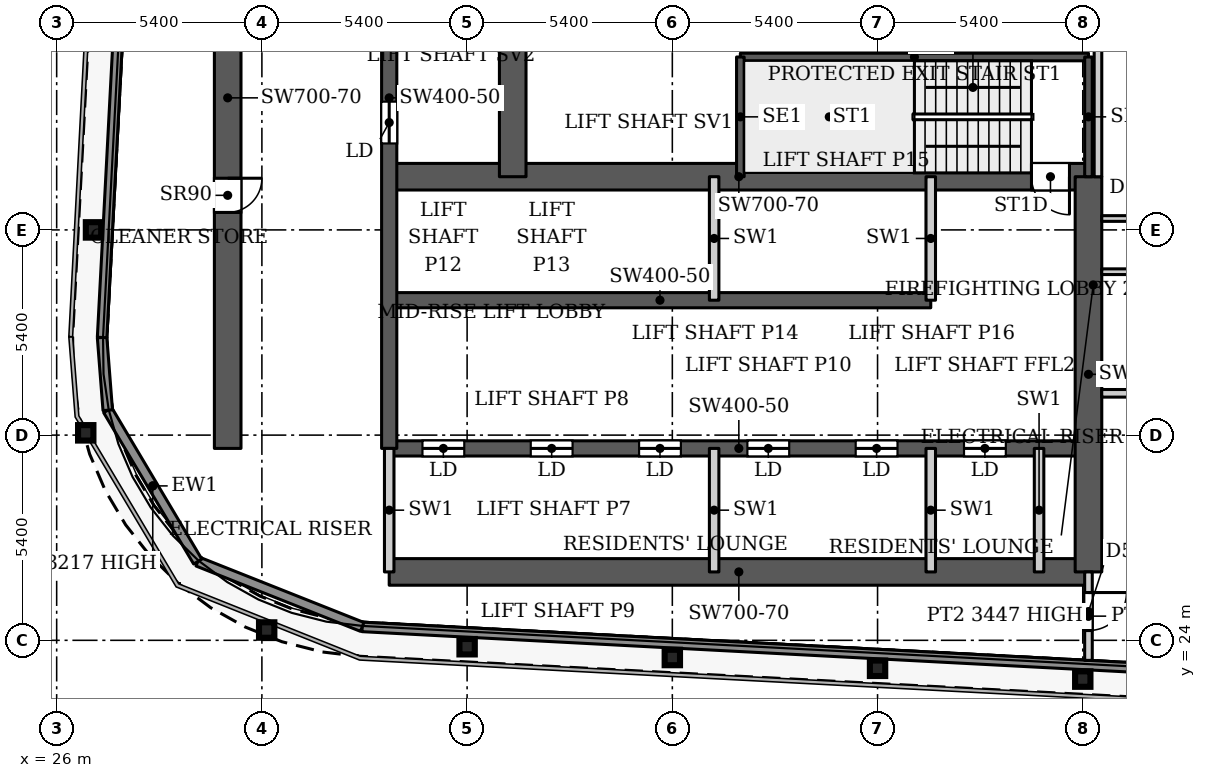
"""IFC4 building model, lengths in metres.
Left out: names, types, materials, properties, quantities, classifications, styles, units other than length and angle.
Written with IfcOpenShell. Run it as: python <this file> out.ifc"""

import sys

from ifc_helpers import new_model, si_unit, direction, frame, frame_2d, origin, origin_2d, place, context, subcontext, project, spatial, rectangle, i_section, extrude, source, transform, mapped, element, fill, save


model = new_model("IFC4")
c1 = context("Model", 3, precision=1e-05, world=origin(), true_north=direction((0.0, 1.0)))
c2 = subcontext(c1, "Body", "Model", "MODEL_VIEW")
j1 = project(units=[si_unit("LENGTHUNIT", "METRE"), si_unit("PLANEANGLEUNIT", "RADIAN")], contexts=[c1])
p1 = place(None, origin())
s1 = spatial("IfcSite", under=j1, at=p1, CompositionType="ELEMENT")
p2 = place(p1, origin())
s2 = spatial("IfcBuilding", under=s1, at=p2, CompositionType="ELEMENT")
p3 = place(p2, frame((0.0, 0.0, 216.2)))
s3 = spatial("IfcBuildingStorey", under=s2, at=p3, CompositionType="ELEMENT", Elevation=216.2)
for number, where, z_axis, x_axis in (
    (1, (53.0, 22.98, 0.0), (0.0, 0.0, 1.0), (1.0, 0.0, 0.0)),
    (2, (47.6, 23.264, 0.0), (0.0, 0.0, 1.0), (1.0, 0.0, 0.0)),
    (3, (42.2, 23.548, 0.0), (0.0, 0.0, 1.0), (1.0, 0.0, 0.0)),
    (4, (36.8, 23.832, 0.0), (0.0, 0.0, 1.0), (1.0, 0.0, 0.0)),
    (5, (31.526, 24.271, 0.0), (0.0, 0.0, 1.0), (1.0, 0.0, 0.0)),
    (6, (26.765, 29.46, 0.0), (0.0, 0.0, 1.0), (1.0, 0.0, 0.0)),
    (7, (26.969, 34.8, 0.0), (0.0, 0.0, 1.0), (1.0, 0.0, 0.0)),
):
    element("IfcColumn", number, at=place(p3, frame(where, z_axis=z_axis, x_axis=x_axis)), inside=s3, PredefinedType="COLUMN", context=c2, shape_type="SweptSolid", body=[
        extrude(i_section(OverallWidth=0.404, OverallDepth=0.407, WebThickness=0.027, FlangeThickness=0.044, FilletRadius=0.012, at=origin_2d()), origin(), (0.0, 0.0, 1.0), 3.9),
    ])
p4 = place(p3, frame((34.75, 25.8, 0.0), z_axis=(0.0, 0.0, 1.0), x_axis=(1.0, 0.0, 0.0)))
e8 = element("IfcWall", 8, at=p4, inside=s3, PredefinedType="SHEAR", context=c2, shape_type="SweptSolid", body=[
    extrude(rectangle(XDim=18.4, YDim=0.7, at=frame_2d((9.2, 0.0))), origin(), (0.0, 0.0, 1.0), 3.9),
])
p5 = place(p3, frame((34.75, 29.05, 0.0), z_axis=(0.0, 0.0, 1.0), x_axis=(1.0, 0.0, 0.0)))
e9 = element("IfcWall", 9, at=p5, inside=s3, PredefinedType="SHEAR", context=c2, shape_type="SweptSolid", body=[
    extrude(rectangle(XDim=18.4, YDim=0.4, at=frame_2d((9.2, 0.0))), origin(), (0.0, 0.0, 1.0), 3.9),
])
p6 = place(p5, frame((0.875, 0.0, 0.0)))
e10 = element("IfcOpeningElement", 10, at=p6, cuts=e9, PredefinedType="OPENING", context=c2, shape_type="SweptSolid", body=[
    extrude(rectangle(XDim=1.1, YDim=2.2, at=frame_2d((0.55, 1.1))), frame((0.0, 0.21, 0.0), z_axis=(0.0, -1.0, 0.0), x_axis=(1.0, 0.0, 0.0)), (0.0, 0.0, 1.0), 0.42),
])
p7 = place(p5, frame((3.725, 0.0, 0.0)))
e11 = element("IfcOpeningElement", 11, at=p7, cuts=e9, PredefinedType="OPENING", context=c2, shape_type="SweptSolid", body=[
    extrude(rectangle(XDim=1.1, YDim=2.2, at=frame_2d((0.55, 1.1))), frame((0.0, 0.21, 0.0), z_axis=(0.0, -1.0, 0.0), x_axis=(1.0, 0.0, 0.0)), (0.0, 0.0, 1.0), 0.42),
])
p8 = place(p5, frame((6.575, 0.0, 0.0)))
e12 = element("IfcOpeningElement", 12, at=p8, cuts=e9, PredefinedType="OPENING", context=c2, shape_type="SweptSolid", body=[
    extrude(rectangle(XDim=1.1, YDim=2.2, at=frame_2d((0.55, 1.1))), frame((0.0, 0.21, 0.0), z_axis=(0.0, -1.0, 0.0), x_axis=(1.0, 0.0, 0.0)), (0.0, 0.0, 1.0), 0.42),
])
p9 = place(p5, frame((9.425, 0.0, 0.0)))
e13 = element("IfcOpeningElement", 13, at=p9, cuts=e9, PredefinedType="OPENING", context=c2, shape_type="SweptSolid", body=[
    extrude(rectangle(XDim=1.1, YDim=2.2, at=frame_2d((0.55, 1.1))), frame((0.0, 0.21, 0.0), z_axis=(0.0, -1.0, 0.0), x_axis=(1.0, 0.0, 0.0)), (0.0, 0.0, 1.0), 0.42),
])
p10 = place(p5, frame((12.275, 0.0, 0.0)))
e14 = element("IfcOpeningElement", 14, at=p10, cuts=e9, PredefinedType="OPENING", context=c2, shape_type="SweptSolid", body=[
    extrude(rectangle(XDim=1.1, YDim=2.2, at=frame_2d((0.55, 1.1))), frame((0.0, 0.21, 0.0), z_axis=(0.0, -1.0, 0.0), x_axis=(1.0, 0.0, 0.0)), (0.0, 0.0, 1.0), 0.42),
])
p11 = place(p5, frame((15.125, 0.0, 0.0)))
e15 = element("IfcOpeningElement", 15, at=p11, cuts=e9, PredefinedType="OPENING", context=c2, shape_type="SweptSolid", body=[
    extrude(rectangle(XDim=1.1, YDim=2.2, at=frame_2d((0.55, 1.1))), frame((0.0, 0.21, 0.0), z_axis=(0.0, -1.0, 0.0), x_axis=(1.0, 0.0, 0.0)), (0.0, 0.0, 1.0), 0.42),
])
p12 = place(p3, frame((34.75, 32.95, 0.0), z_axis=(0.0, 0.0, 1.0), x_axis=(1.0, 0.0, 0.0)))
e16 = element("IfcWall", 16, at=p12, inside=s3, PredefinedType="SHEAR", context=c2, shape_type="SweptSolid", body=[
    extrude(rectangle(XDim=14.25, YDim=0.4, at=frame_2d((7.125, 0.0))), origin(), (0.0, 0.0, 1.0), 3.9),
])
p13 = place(p3, frame((34.75, 36.2, 0.0), z_axis=(0.0, 0.0, 1.0), x_axis=(1.0, 0.0, 0.0)))
e17 = element("IfcWall", 17, at=p13, inside=s3, PredefinedType="SHEAR", context=c2, shape_type="SweptSolid", body=[
    extrude(rectangle(XDim=18.4, YDim=0.7, at=frame_2d((9.2, 0.0))), origin(), (0.0, 0.0, 1.0), 3.9),
])
p14 = place(p13, frame((16.9, 0.0, 0.0)))
e18 = element("IfcOpeningElement", 18, at=p14, cuts=e17, PredefinedType="OPENING", context=c2, shape_type="SweptSolid", body=[
    extrude(rectangle(XDim=1.0, YDim=2.2, at=frame_2d((0.5, 1.1))), frame((0.0, 0.36, 0.0), z_axis=(0.0, -1.0, 0.0), x_axis=(1.0, 0.0, 0.0)), (0.0, 0.0, 1.0), 0.72),
])
p15 = place(p3, frame((34.75, 29.05, 0.0), z_axis=(0.0, 0.0, 1.0), x_axis=(0.0, 1.0, 0.0)))
e19 = element("IfcWall", 19, at=p15, inside=s3, PredefinedType="SHEAR", context=c2, shape_type="SweptSolid", body=[
    extrude(rectangle(XDim=18.45, YDim=0.4, at=frame_2d((9.225, 0.0))), origin(), (0.0, 0.0, 1.0), 3.9),
])
p16 = place(p15, frame((8.025, 0.0, 0.0)))
e20 = element("IfcOpeningElement", 20, at=p16, cuts=e19, PredefinedType="OPENING", context=c2, shape_type="SweptSolid", body=[
    extrude(rectangle(XDim=1.1, YDim=2.2, at=frame_2d((0.55, 1.1))), frame((0.0, 0.21, 0.0), z_axis=(0.0, -1.0, 0.0), x_axis=(1.0, 0.0, 0.0)), (0.0, 0.0, 1.0), 0.42),
])
p17 = place(p15, frame((10.875, 0.0, 0.0)))
e21 = element("IfcOpeningElement", 21, at=p17, cuts=e19, PredefinedType="OPENING", context=c2, shape_type="SweptSolid", body=[
    extrude(rectangle(XDim=1.1, YDim=2.2, at=frame_2d((0.55, 1.1))), frame((0.0, 0.21, 0.0), z_axis=(0.0, -1.0, 0.0), x_axis=(1.0, 0.0, 0.0)), (0.0, 0.0, 1.0), 0.42),
])
p18 = place(p15, frame((13.725, 0.0, 0.0)))
e22 = element("IfcOpeningElement", 22, at=p18, cuts=e19, PredefinedType="OPENING", context=c2, shape_type="SweptSolid", body=[
    extrude(rectangle(XDim=1.1, YDim=2.2, at=frame_2d((0.55, 1.1))), frame((0.0, 0.21, 0.0), z_axis=(0.0, -1.0, 0.0), x_axis=(1.0, 0.0, 0.0)), (0.0, 0.0, 1.0), 0.42),
])
p19 = place(p15, frame((15.95, 0.0, 0.0)))
e23 = element("IfcOpeningElement", 23, at=p19, cuts=e19, PredefinedType="OPENING", context=c2, shape_type="SweptSolid", body=[
    extrude(rectangle(XDim=1.1, YDim=2.2, at=frame_2d((0.55, 1.1))), frame((0.0, 0.21, 0.0), z_axis=(0.0, -1.0, 0.0), x_axis=(1.0, 0.0, 0.0)), (0.0, 0.0, 1.0), 0.42),
])
p20 = place(p3, frame((38.0, 36.2, 0.0), z_axis=(0.0, 0.0, 1.0), x_axis=(0.0, 1.0, 0.0)))
e24 = element("IfcWall", 24, at=p20, inside=s3, PredefinedType="SHEAR", context=c2, shape_type="SweptSolid", body=[
    extrude(rectangle(XDim=8.55, YDim=0.7, at=frame_2d((4.275, 0.0))), origin(), (0.0, 0.0, 1.0), 3.9),
])
p21 = place(p3, frame((30.5, 29.05, 0.0), z_axis=(0.0, 0.0, 1.0), x_axis=(0.0, 1.0, 0.0)))
e25 = element("IfcWall", 25, at=p21, inside=s3, PredefinedType="SHEAR", context=c2, shape_type="SweptSolid", body=[
    extrude(rectangle(XDim=18.45, YDim=0.7, at=frame_2d((9.225, 0.0))), origin(), (0.0, 0.0, 1.0), 3.9),
])
p22 = place(p21, frame((6.21, 0.0, 0.0)))
e26 = element("IfcOpeningElement", 26, at=p22, cuts=e25, PredefinedType="OPENING", context=c2, shape_type="SweptSolid", body=[
    extrude(rectangle(XDim=0.9, YDim=2.2, at=frame_2d((0.45, 1.1))), frame((0.0, 0.36, 0.0), z_axis=(0.0, -1.0, 0.0), x_axis=(1.0, 0.0, 0.0)), (0.0, 0.0, 1.0), 0.72),
])
p23 = place(p21, frame((10.684, 0.0, 0.0)))
e27 = element("IfcOpeningElement", 27, at=p23, cuts=e25, PredefinedType="OPENING", context=c2, shape_type="SweptSolid", body=[
    extrude(rectangle(XDim=0.9, YDim=2.2, at=frame_2d((0.45, 1.1))), frame((0.0, 0.36, 0.0), z_axis=(0.0, -1.0, 0.0), x_axis=(1.0, 0.0, 0.0)), (0.0, 0.0, 1.0), 0.72),
])
p24 = place(p3, frame((53.15, 25.8, 0.0), z_axis=(0.0, 0.0, 1.0), x_axis=(0.0, 1.0, 0.0)))
e28 = element("IfcWall", 28, at=p24, inside=s3, PredefinedType="SHEAR", context=c2, shape_type="SweptSolid", body=[
    extrude(rectangle(XDim=10.4, YDim=0.7, at=frame_2d((5.2, 0.0))), origin(), (0.0, 0.0, 1.0), 3.9),
])
p25 = place(p3, frame((84.386, 21.703, 0.0), z_axis=(0.0, 0.0, 1.0), x_axis=(-0.998617508267, 0.05256493302, 0.0)))
e29 = element("IfcWall", 29, at=p25, inside=s3, PredefinedType="SOLIDWALL", context=c2, shape_type="SweptSolid", body=[
    extrude(rectangle(XDim=50.417, YDim=0.25, at=frame_2d((25.208, 0.0))), origin(), (0.0, 0.0, 1.0), 3.75),
])
p26 = place(p3, frame((34.039, 24.353, 0.0), z_axis=(0.0, 0.0, 1.0), x_axis=(-0.929352825399, 0.369192803184, 0.0)))
e30 = element("IfcWall", 30, at=p26, inside=s3, PredefinedType="SOLIDWALL", context=c2, shape_type="SweptSolid", body=[
    extrude(rectangle(XDim=4.656, YDim=0.25, at=frame_2d((2.328, 0.0))), origin(), (0.0, 0.0, 1.0), 3.75),
])
p27 = place(p3, frame((29.712, 26.072, 0.0), z_axis=(0.0, 0.0, 1.0), x_axis=(-0.511028049012, 0.859564036662, 0.0)))
e31 = element("IfcWall", 31, at=p27, inside=s3, PredefinedType="SOLIDWALL", context=c2, shape_type="SweptSolid", body=[
    extrude(rectangle(XDim=4.634, YDim=0.25, at=frame_2d((2.317, 0.0))), origin(), (0.0, 0.0, 1.0), 3.217),
])
p28 = place(p3, frame((27.344, 30.055, 0.0), z_axis=(0.0, 0.0, 1.0), x_axis=(-0.077571675317, 0.99698677784, 0.0)))
e32 = element("IfcWall", 32, at=p28, inside=s3, PredefinedType="SOLIDWALL", context=c2, shape_type="SweptSolid", body=[
    extrude(rectangle(XDim=1.92, YDim=0.25, at=frame_2d((0.96, 0.0))), origin(), (0.0, 0.0, 1.0), 3.75),
])
p29 = place(p3, frame((27.195, 31.969, 0.0), z_axis=(0.0, 0.0, 1.0), x_axis=(0.052559748861, 0.998617781135, 0.0)))
e33 = element("IfcWall", 33, at=p29, inside=s3, PredefinedType="SOLIDWALL", context=c2, shape_type="SweptSolid", body=[
    extrude(rectangle(XDim=55.972, YDim=0.25, at=frame_2d((27.986, 0.0))), origin(), (0.0, 0.0, 1.0), 3.75),
])
p30 = place(p3, frame((43.99, 39.35, 0.0), z_axis=(0.0, 0.0, 1.0), x_axis=(1.0, 0.0, 0.0)))
e34 = element("IfcWall", 34, at=p30, inside=s3, PredefinedType="SHEAR", context=c2, shape_type="SweptSolid", body=[
    extrude(rectangle(XDim=9.16, YDim=0.2, at=frame_2d((4.58, 0.0))), origin(), (0.0, 0.0, 1.0), 3.9),
])
for number, where, z_axis, x_axis in (
    (35, (43.99, 36.2, 0.0), (0.0, 0.0, 1.0), (0.0, 1.0, 0.0)),
    (36, (53.15, 36.2, 0.0), (0.0, 0.0, 1.0), (0.0, 1.0, 0.0)),
):
    element("IfcWall", number, at=place(p3, frame(where, z_axis=z_axis, x_axis=x_axis)), inside=s3, PredefinedType="SHEAR", context=c2, shape_type="SweptSolid", body=[
        extrude(rectangle(XDim=3.15, YDim=0.2, at=frame_2d((1.575, 0.0))), origin(), (0.0, 0.0, 1.0), 3.9),
    ])
for number, where, z_axis, x_axis in (
    (37, (34.75, 25.8, 0.0), (0.0, 0.0, 1.0), (0.0, 1.0, 0.0)),
    (38, (43.3, 25.8, 0.0), (0.0, 0.0, 1.0), (0.0, 1.0, 0.0)),
    (39, (43.3, 32.95, 0.0), (0.0, 0.0, 1.0), (0.0, 1.0, 0.0)),
    (40, (49.0, 25.8, 0.0), (0.0, 0.0, 1.0), (0.0, 1.0, 0.0)),
    (41, (49.0, 32.95, 0.0), (0.0, 0.0, 1.0), (0.0, 1.0, 0.0)),
    (42, (51.85, 25.8, 0.0), (0.0, 0.0, 1.0), (0.0, 1.0, 0.0)),
):
    element("IfcWall", number, at=place(p3, frame(where, z_axis=z_axis, x_axis=x_axis)), inside=s3, PredefinedType="PARTITIONING", context=c2, shape_type="SweptSolid", body=[
        extrude(rectangle(XDim=3.25, YDim=0.25, at=frame_2d((1.625, 0.0))), origin(), (0.0, 0.0, 1.0), 3.9),
    ])
p31 = place(p3, frame((53.15, 23.472, 0.0), z_axis=(0.0, 0.0, 1.0), x_axis=(0.0, 1.0, 0.0)))
e43 = element("IfcWall", 43, at=p31, inside=s3, PredefinedType="PARTITIONING", context=c2, shape_type="SweptSolid", body=[
    extrude(rectangle(XDim=2.328, YDim=0.2, at=frame_2d((1.164, 0.0))), origin(), (0.0, 0.0, 1.0), 3.447),
])
p32 = place(p31, frame((0.785, 0.0, 0.0)))
e44 = element("IfcOpeningElement", 44, at=p32, cuts=e43, PredefinedType="OPENING", context=c2, shape_type="SweptSolid", body=[
    extrude(rectangle(XDim=1.0, YDim=2.1, at=frame_2d((0.5, 1.05))), frame((0.0, 0.11, 0.0), z_axis=(0.0, -1.0, 0.0), x_axis=(1.0, 0.0, 0.0)), (0.0, 0.0, 1.0), 0.22),
])
p33 = place(p3, frame((53.4, 36.199, 0.0), z_axis=(0.0, 0.0, 1.0), x_axis=(0.0, 1.0, 0.0)))
e45 = element("IfcWall", 45, at=p33, inside=s3, PredefinedType="PARTITIONING", context=c2, shape_type="SweptSolid", body=[
    extrude(rectangle(XDim=7.701, YDim=0.2, at=frame_2d((3.851, 0.0))), origin(), (0.0, 0.0, 1.0), 3.6),
])
p34 = place(p3, frame((53.499, 30.5, 0.0), z_axis=(0.0, 0.0, 1.0), x_axis=(1.0, 0.0, 0.0)))
e46 = element("IfcWall", 46, at=p34, inside=s3, PredefinedType="PARTITIONING", context=c2, shape_type="SweptSolid", body=[
    extrude(rectangle(XDim=28.401, YDim=0.2, at=frame_2d((14.2, 0.0))), origin(), (0.0, 0.0, 1.0), 3.6),
])
p35 = place(p34, frame((10.201, 0.0, 0.0)))
e47 = element("IfcOpeningElement", 47, at=p35, cuts=e46, PredefinedType="OPENING", context=c2, shape_type="SweptSolid", body=[
    extrude(rectangle(XDim=1.0, YDim=2.1, at=frame_2d((0.5, 1.05))), frame((0.0, 0.11, 0.0), z_axis=(0.0, -1.0, 0.0), x_axis=(1.0, 0.0, 0.0)), (0.0, 0.0, 1.0), 0.22),
])
p36 = place(p34, frame((12.151, 0.0, 0.0)))
e48 = element("IfcOpeningElement", 48, at=p36, cuts=e46, PredefinedType="OPENING", context=c2, shape_type="SweptSolid", body=[
    extrude(rectangle(XDim=1.0, YDim=2.1, at=frame_2d((0.5, 1.05))), frame((0.0, 0.11, 0.0), z_axis=(0.0, -1.0, 0.0), x_axis=(1.0, 0.0, 0.0)), (0.0, 0.0, 1.0), 0.22),
])
p37 = place(p34, frame((24.001, 0.0, 0.0)))
e49 = element("IfcOpeningElement", 49, at=p37, cuts=e46, PredefinedType="OPENING", context=c2, shape_type="SweptSolid", body=[
    extrude(rectangle(XDim=1.0, YDim=2.1, at=frame_2d((0.5, 1.05))), frame((0.0, 0.11, 0.0), z_axis=(0.0, -1.0, 0.0), x_axis=(1.0, 0.0, 0.0)), (0.0, 0.0, 1.0), 0.22),
])
p38 = place(p3, frame((53.499, 33.7, 0.0), z_axis=(0.0, 0.0, 1.0), x_axis=(1.0, 0.0, 0.0)))
e50 = element("IfcWall", 50, at=p38, inside=s3, PredefinedType="PARTITIONING", context=c2, shape_type="SweptSolid", body=[
    extrude(rectangle(XDim=9.876, YDim=0.15, at=frame_2d((4.938, 0.0))), origin(), (0.0, 0.0, 1.0), 3.6),
])
p39 = place(p38, frame((6.851, 0.0, 0.0)))
e51 = element("IfcOpeningElement", 51, at=p39, cuts=e50, PredefinedType="OPENING", context=c2, shape_type="SweptSolid", body=[
    extrude(rectangle(XDim=0.8, YDim=2.1, at=frame_2d((0.4, 1.05))), frame((0.0, 0.085, 0.0), z_axis=(0.0, -1.0, 0.0), x_axis=(1.0, 0.0, 0.0)), (0.0, 0.0, 1.0), 0.17),
])
p40 = place(p38, frame((0.851, 0.0, 0.0)))
e52 = element("IfcOpeningElement", 52, at=p40, cuts=e50, PredefinedType="OPENING", context=c2, shape_type="SweptSolid", body=[
    extrude(rectangle(XDim=0.9, YDim=2.1, at=frame_2d((0.45, 1.05))), frame((0.0, 0.085, 0.0), z_axis=(0.0, -1.0, 0.0), x_axis=(1.0, 0.0, 0.0)), (0.0, 0.0, 1.0), 0.17),
])
p41 = place(p38, frame((4.901, 0.0, 0.0)))
e53 = element("IfcOpeningElement", 53, at=p41, cuts=e50, PredefinedType="OPENING", context=c2, shape_type="SweptSolid", body=[
    extrude(rectangle(XDim=0.8, YDim=2.1, at=frame_2d((0.4, 1.05))), frame((0.0, 0.085, 0.0), z_axis=(0.0, -1.0, 0.0), x_axis=(1.0, 0.0, 0.0)), (0.0, 0.0, 1.0), 0.17),
])
p42 = place(p38, frame((8.651, 0.0, 0.0)))
e54 = element("IfcOpeningElement", 54, at=p42, cuts=e50, PredefinedType="OPENING", context=c2, shape_type="SweptSolid", body=[
    extrude(rectangle(XDim=0.8, YDim=2.1, at=frame_2d((0.4, 1.05))), frame((0.0, 0.085, 0.0), z_axis=(0.0, -1.0, 0.0), x_axis=(1.0, 0.0, 0.0)), (0.0, 0.0, 1.0), 0.17),
])
p43 = place(p3, frame((53.499, 35.1, 0.0), z_axis=(0.0, 0.0, 1.0), x_axis=(1.0, 0.0, 0.0)))
e55 = element("IfcWall", 55, at=p43, inside=s3, PredefinedType="PARTITIONING", context=c2, shape_type="SweptSolid", body=[
    extrude(rectangle(XDim=11.501, YDim=0.15, at=frame_2d((5.75, 0.0))), origin(), (0.0, 0.0, 1.0), 3.6),
])
p44 = place(p43, frame((5.001, 0.0, 0.0)))
e56 = element("IfcOpeningElement", 56, at=p44, cuts=e55, PredefinedType="OPENING", context=c2, shape_type="SweptSolid", body=[
    extrude(rectangle(XDim=0.9, YDim=2.1, at=frame_2d((0.45, 1.05))), frame((0.0, 0.085, 0.0), z_axis=(0.0, -1.0, 0.0), x_axis=(1.0, 0.0, 0.0)), (0.0, 0.0, 1.0), 0.17),
])
p45 = place(p43, frame((1.701, 0.0, 0.0)))
e57 = element("IfcOpeningElement", 57, at=p45, cuts=e55, PredefinedType="OPENING", context=c2, shape_type="SweptSolid", body=[
    extrude(rectangle(XDim=1.0, YDim=2.1, at=frame_2d((0.5, 1.05))), frame((0.0, 0.085, 0.0), z_axis=(0.0, -1.0, 0.0), x_axis=(1.0, 0.0, 0.0)), (0.0, 0.0, 1.0), 0.17),
])
p46 = place(p43, frame((7.701, 0.0, 0.0)))
e58 = element("IfcOpeningElement", 58, at=p46, cuts=e55, PredefinedType="OPENING", context=c2, shape_type="SweptSolid", body=[
    extrude(rectangle(XDim=0.9, YDim=2.1, at=frame_2d((0.45, 1.05))), frame((0.0, 0.085, 0.0), z_axis=(0.0, -1.0, 0.0), x_axis=(1.0, 0.0, 0.0)), (0.0, 0.0, 1.0), 0.17),
])
m1 = source(origin(), c2, "Body", "SweptSolid", [
    extrude(rectangle(XDim=1.1, YDim=2.2, at=frame_2d((0.55, 1.1))), frame((0.0, 0.025, 0.0), z_axis=(0.0, -1.0, 0.0), x_axis=(1.0, 0.0, 0.0)), (0.0, 0.0, 1.0), 0.05),
])
p47 = place(p6, origin())
e59 = element("IfcDoor", 59, at=p47, inside=s3, OperationType="SLIDING_TO_LEFT", PredefinedType="DOOR", context=c2, shape_type="MappedRepresentation", body=[
    mapped(m1, transform((0.0, 0.0, 0.0), x_axis=(1.0, 0.0, 0.0), y_axis=(0.0, 1.0, 0.0), z_axis=(0.0, 0.0, 1.0), scale=1.0)),
])
fill(e10, e59)
p48 = place(p7, origin())
e60 = element("IfcDoor", 60, at=p48, inside=s3, OperationType="SLIDING_TO_LEFT", PredefinedType="DOOR", context=c2, shape_type="MappedRepresentation", body=[
    mapped(m1, transform((0.0, 0.0, 0.0), x_axis=(1.0, 0.0, 0.0), y_axis=(0.0, 1.0, 0.0), z_axis=(0.0, 0.0, 1.0), scale=1.0)),
])
fill(e11, e60)
p49 = place(p8, origin())
e61 = element("IfcDoor", 61, at=p49, inside=s3, OperationType="SLIDING_TO_LEFT", PredefinedType="DOOR", context=c2, shape_type="MappedRepresentation", body=[
    mapped(m1, transform((0.0, 0.0, 0.0), x_axis=(1.0, 0.0, 0.0), y_axis=(0.0, 1.0, 0.0), z_axis=(0.0, 0.0, 1.0), scale=1.0)),
])
fill(e12, e61)
p50 = place(p9, origin())
e62 = element("IfcDoor", 62, at=p50, inside=s3, OperationType="SLIDING_TO_LEFT", PredefinedType="DOOR", context=c2, shape_type="MappedRepresentation", body=[
    mapped(m1, transform((0.0, 0.0, 0.0), x_axis=(1.0, 0.0, 0.0), y_axis=(0.0, 1.0, 0.0), z_axis=(0.0, 0.0, 1.0), scale=1.0)),
])
fill(e13, e62)
p51 = place(p10, origin())
e63 = element("IfcDoor", 63, at=p51, inside=s3, OperationType="SLIDING_TO_LEFT", PredefinedType="DOOR", context=c2, shape_type="MappedRepresentation", body=[
    mapped(m1, transform((0.0, 0.0, 0.0), x_axis=(1.0, 0.0, 0.0), y_axis=(0.0, 1.0, 0.0), z_axis=(0.0, 0.0, 1.0), scale=1.0)),
])
fill(e14, e63)
p52 = place(p16, origin())
e64 = element("IfcDoor", 64, at=p52, inside=s3, OperationType="SLIDING_TO_LEFT", PredefinedType="DOOR", context=c2, shape_type="MappedRepresentation", body=[
    mapped(m1, transform((0.0, 0.0, 0.0), x_axis=(1.0, 0.0, 0.0), y_axis=(0.0, 1.0, 0.0), z_axis=(0.0, 0.0, 1.0), scale=1.0)),
])
fill(e20, e64)
p53 = place(p11, origin())
e65 = element("IfcDoor", 65, at=p53, inside=s3, OperationType="SLIDING_TO_LEFT", PredefinedType="DOOR", context=c2, shape_type="MappedRepresentation", body=[
    mapped(m1, transform((0.0, 0.0, 0.0), x_axis=(1.0, 0.0, 0.0), y_axis=(0.0, 1.0, 0.0), z_axis=(0.0, 0.0, 1.0), scale=1.0)),
])
fill(e15, e65)
m2 = source(origin(), c2, "Body", "SweptSolid", [
    extrude(rectangle(XDim=0.9, YDim=2.2, at=frame_2d((0.45, 1.1))), frame((0.0, 0.025, 0.0), z_axis=(0.0, -1.0, 0.0), x_axis=(1.0, 0.0, 0.0)), (0.0, 0.0, 1.0), 0.05),
])
p54 = place(p22, origin())
e66 = element("IfcDoor", 66, at=p54, inside=s3, OperationType="SINGLE_SWING_RIGHT", PredefinedType="DOOR", context=c2, shape_type="MappedRepresentation", body=[
    mapped(m2, transform((0.0, 0.0, 0.0), x_axis=(1.0, 0.0, 0.0), y_axis=(0.0, 1.0, 0.0), z_axis=(0.0, 0.0, 1.0), scale=1.0)),
])
fill(e26, e66)
m3 = source(origin(), c2, "Body", "SweptSolid", [
    extrude(rectangle(XDim=1.0, YDim=2.2, at=frame_2d((0.5, 1.1))), frame((0.0, 0.025, 0.0), z_axis=(0.0, -1.0, 0.0), x_axis=(1.0, 0.0, 0.0)), (0.0, 0.0, 1.0), 0.05),
])
p55 = place(p14, origin())
e67 = element("IfcDoor", 67, at=p55, inside=s3, OperationType="SINGLE_SWING_RIGHT", PredefinedType="DOOR", context=c2, shape_type="MappedRepresentation", body=[
    mapped(m3, transform((0.0, 0.0, 0.0), x_axis=(1.0, 0.0, 0.0), y_axis=(0.0, 1.0, 0.0), z_axis=(0.0, 0.0, 1.0), scale=1.0)),
])
fill(e18, e67)
m4 = source(origin(), c2, "Body", "SweptSolid", [
    extrude(rectangle(XDim=1.0, YDim=2.1, at=frame_2d((0.5, 1.05))), frame((0.0, 0.025, 0.0), z_axis=(0.0, -1.0, 0.0), x_axis=(1.0, 0.0, 0.0)), (0.0, 0.0, 1.0), 0.05),
])
p56 = place(p32, origin())
e68 = element("IfcDoor", 68, at=p56, inside=s3, OperationType="SINGLE_SWING_RIGHT", PredefinedType="DOOR", context=c2, shape_type="MappedRepresentation", body=[
    mapped(m4, transform((0.0, 0.0, 0.0), x_axis=(1.0, 0.0, 0.0), y_axis=(0.0, 1.0, 0.0), z_axis=(0.0, 0.0, 1.0), scale=1.0)),
])
fill(e44, e68)
save(model, sys.argv[1])
